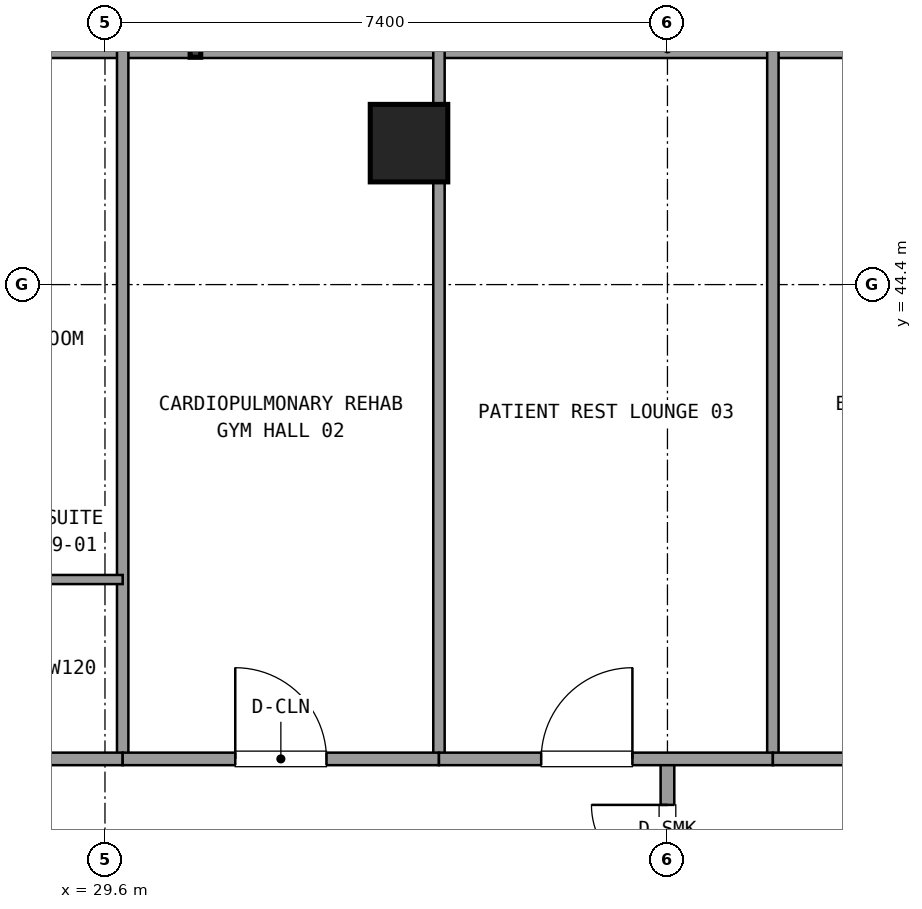
"""IFC4 building model, lengths in metres.
Left out: names, types, materials, properties, quantities, classifications, styles, units other than length and angle.
Written with IfcOpenShell. Run it as: python <this file> out.ifc"""

import sys

from ifc_helpers import new_model, si_unit, direction, frame, frame_2d, origin, origin_2d, place, context, subcontext, project, spatial, rectangle, extrude, element, fill, save


model = new_model("IFC4")
c1 = context("Model", 3, precision=1e-05, world=origin(), true_north=direction((0.0, 1.0)))
c2 = subcontext(c1, "Body", "Model", "MODEL_VIEW")
j1 = project(units=[si_unit("LENGTHUNIT", "METRE"), si_unit("PLANEANGLEUNIT", "RADIAN")], contexts=[c1])
p1 = place(None, origin())
s1 = spatial("IfcSite", under=j1, at=p1, CompositionType="ELEMENT")
p2 = place(p1, origin())
s2 = spatial("IfcBuilding", under=s1, at=p2, CompositionType="ELEMENT")
p3 = place(p2, frame((0.0, 0.0, 113.58)))
s3 = spatial("IfcBuildingStorey", under=s2, at=p3, CompositionType="ELEMENT", Elevation=113.58)
p4 = place(p3, frame((33.6, 46.261, 0.021), z_axis=(0.0, -0.024969910516, 0.999688203176), x_axis=(1.0, 0.0, 0.0)))
e1 = element("IfcColumn", 1, at=p4, inside=s3, PredefinedType="COLUMN", context=c2, shape_type="SweptSolid", body=[
    extrude(rectangle(XDim=1.02, YDim=1.02, at=origin_2d()), origin(), (0.0, 0.0, 1.0), 3.559),
])
p5 = place(p3, frame((55.629, 47.501, 0.0), z_axis=(0.0, 0.0, 1.0), x_axis=(-1.0, 0.0, 0.0)))
e2 = element("IfcWall", 2, at=p5, inside=s3, PredefinedType="SOLIDWALL", context=c2, shape_type="SweptSolid", body=[
    extrude(rectangle(XDim=37.258, YDim=0.24, at=frame_2d((18.629, 0.0))), origin(), (0.0, 0.0, 1.0), 0.85),
])
p6 = place(p3, frame((37.0, 34.95, 0.0), z_axis=(0.0, 0.0, 1.0), x_axis=(0.0, 1.0, 0.0)))
e3 = element("IfcWall", 3, at=p6, inside=s3, PredefinedType="PARTITIONING", context=c2, shape_type="SweptSolid", body=[
    extrude(rectangle(XDim=3.21, YDim=0.18, at=frame_2d((1.605, 0.0))), origin(), (0.0, 0.0, 1.0), 2.61),
])
p7 = place(p6, frame((0.605, 0.0, 0.0)))
e4 = element("IfcOpeningElement", 4, at=p7, cuts=e3, PredefinedType="OPENING", context=c2, shape_type="SweptSolid", body=[
    extrude(rectangle(XDim=2.0, YDim=2.2, at=frame_2d((1.0, 1.1))), frame((0.0, 0.1, 0.0), z_axis=(0.0, -1.0, 0.0), x_axis=(1.0, 0.0, 0.0)), (0.0, 0.0, 1.0), 0.2),
])
p8 = place(p3, frame((29.833, 38.16, 0.0), z_axis=(0.0, 0.0, 1.0), x_axis=(0.0, 1.0, 0.0)))
e5 = element("IfcWall", 5, at=p8, inside=s3, PredefinedType="PARTITIONING", context=c2, shape_type="SweptSolid", body=[
    extrude(rectangle(XDim=9.32, YDim=0.15, at=frame_2d((4.66, 0.0))), origin(), (0.0, 0.0, 1.0), 2.61),
])
p9 = place(p3, frame((25.43, 38.16, 0.0), z_axis=(0.0, 0.0, 1.0), x_axis=(1.0, 0.0, 0.0)))
e6 = element("IfcWall", 6, at=p9, inside=s3, PredefinedType="PARTITIONING", context=c2, shape_type="SweptSolid", body=[
    extrude(rectangle(XDim=4.403, YDim=0.165, at=frame_2d((2.202, 0.0))), origin(), (0.0, 0.0, 1.0), 2.61),
])
p10 = place(p9, frame((0.35, 0.0, 0.0)))
e7 = element("IfcOpeningElement", 7, at=p10, cuts=e6, PredefinedType="OPENING", context=c2, shape_type="SweptSolid", body=[
    extrude(rectangle(XDim=1.35, YDim=2.15, at=frame_2d((0.675, 1.075))), frame((0.0, 0.093, 0.0), z_axis=(0.0, -1.0, 0.0), x_axis=(1.0, 0.0, 0.0)), (0.0, 0.0, 1.0), 0.185),
])
p11 = place(p3, frame((27.693, 40.52, 0.0), z_axis=(0.0, 0.0, 1.0), x_axis=(1.0, 0.0, 0.0)))
e8 = element("IfcWall", 8, at=p11, inside=s3, PredefinedType="PLUMBINGWALL", context=c2, shape_type="SweptSolid", body=[
    extrude(rectangle(XDim=2.14, YDim=0.12, at=frame_2d((1.07, 0.0))), origin(), (0.0, 0.0, 1.0), 2.61),
])
p12 = place(p3, frame((33.994, 38.16, 0.0), z_axis=(0.0, 0.0, 1.0), x_axis=(0.0, 1.0, 0.0)))
e9 = element("IfcWall", 9, at=p12, inside=s3, PredefinedType="PARTITIONING", context=c2, shape_type="SweptSolid", body=[
    extrude(rectangle(XDim=9.32, YDim=0.15, at=frame_2d((4.66, 0.0))), origin(), (0.0, 0.0, 1.0), 2.61),
])
p13 = place(p3, frame((29.833, 38.16, 0.0), z_axis=(0.0, 0.0, 1.0), x_axis=(1.0, 0.0, 0.0)))
e10 = element("IfcWall", 10, at=p13, inside=s3, PredefinedType="PARTITIONING", context=c2, shape_type="SweptSolid", body=[
    extrude(rectangle(XDim=4.161, YDim=0.165, at=frame_2d((2.081, 0.0))), origin(), (0.0, 0.0, 1.0), 2.61),
])
p14 = place(p13, frame((1.481, 0.0, 0.0)))
e11 = element("IfcOpeningElement", 11, at=p14, cuts=e10, PredefinedType="OPENING", context=c2, shape_type="SweptSolid", body=[
    extrude(rectangle(XDim=1.2, YDim=2.15, at=frame_2d((0.6, 1.075))), frame((0.0, 0.093, 0.0), z_axis=(0.0, -1.0, 0.0), x_axis=(1.0, 0.0, 0.0)), (0.0, 0.0, 1.0), 0.185),
])
p15 = place(p3, frame((38.387, 38.16, 0.0), z_axis=(0.0, 0.0, 1.0), x_axis=(0.0, 1.0, 0.0)))
e12 = element("IfcWall", 12, at=p15, inside=s3, PredefinedType="PARTITIONING", context=c2, shape_type="SweptSolid", body=[
    extrude(rectangle(XDim=9.32, YDim=0.15, at=frame_2d((4.66, 0.0))), origin(), (0.0, 0.0, 1.0), 2.61),
])
p16 = place(p3, frame((33.994, 38.16, 0.0), z_axis=(0.0, 0.0, 1.0), x_axis=(1.0, 0.0, 0.0)))
e13 = element("IfcWall", 13, at=p16, inside=s3, PredefinedType="PARTITIONING", context=c2, shape_type="SweptSolid", body=[
    extrude(rectangle(XDim=4.393, YDim=0.165, at=frame_2d((2.197, 0.0))), origin(), (0.0, 0.0, 1.0), 2.61),
])
p17 = place(p16, frame((1.345, 0.0, 0.0)))
e14 = element("IfcOpeningElement", 14, at=p17, cuts=e13, PredefinedType="OPENING", context=c2, shape_type="SweptSolid", body=[
    extrude(rectangle(XDim=1.2, YDim=2.15, at=frame_2d((0.6, 1.075))), frame((0.0, 0.093, 0.0), z_axis=(0.0, -1.0, 0.0), x_axis=(1.0, 0.0, 0.0)), (0.0, 0.0, 1.0), 0.185),
])
p18 = place(p3, frame((38.387, 38.16, 0.0), z_axis=(0.0, 0.0, 1.0), x_axis=(1.0, 0.0, 0.0)))
e15 = element("IfcWall", 15, at=p18, inside=s3, PredefinedType="PARTITIONING", context=c2, shape_type="SweptSolid", body=[
    extrude(rectangle(XDim=4.855, YDim=0.165, at=frame_2d((2.427, 0.0))), origin(), (0.0, 0.0, 1.0), 2.61),
])
p19 = place(p18, frame((1.827, 0.0, 0.0)))
e16 = element("IfcOpeningElement", 16, at=p19, cuts=e15, PredefinedType="OPENING", context=c2, shape_type="SweptSolid", body=[
    extrude(rectangle(XDim=1.2, YDim=2.15, at=frame_2d((0.6, 1.075))), frame((0.0, 0.093, 0.0), z_axis=(0.0, -1.0, 0.0), x_axis=(1.0, 0.0, 0.0)), (0.0, 0.0, 1.0), 0.185),
])
p20 = place(p7, origin())
e17 = element("IfcDoor", 17, at=p20, inside=s3, OperationType="DOUBLE_DOOR_SINGLE_SWING", PredefinedType="DOOR", context=c2, shape_type="SweptSolid", body=[
    extrude(rectangle(XDim=2.0, YDim=2.2, at=frame_2d((1.0, 1.1))), frame((0.0, 0.025, 0.0), z_axis=(0.0, -1.0, 0.0), x_axis=(1.0, 0.0, 0.0)), (0.0, 0.0, 1.0), 0.05),
])
fill(e4, e17)
p21 = place(p14, origin())
e18 = element("IfcDoor", 18, at=p21, inside=s3, OperationType="SINGLE_SWING_LEFT", PredefinedType="DOOR", context=c2, shape_type="SweptSolid", body=[
    extrude(rectangle(XDim=1.2, YDim=2.15, at=frame_2d((0.6, 1.075))), frame((0.0, 0.025, 0.0), z_axis=(0.0, -1.0, 0.0), x_axis=(1.0, 0.0, 0.0)), (0.0, 0.0, 1.0), 0.05),
])
fill(e11, e18)
p22 = place(p17, origin())
e19 = element("IfcDoor", 19, at=p22, inside=s3, OperationType="SINGLE_SWING_RIGHT", PredefinedType="DOOR", context=c2, shape_type="SweptSolid", body=[
    extrude(rectangle(XDim=1.2, YDim=2.15, at=frame_2d((0.6, 1.075))), frame((0.0, 0.025, 0.0), z_axis=(0.0, -1.0, 0.0), x_axis=(1.0, 0.0, 0.0)), (0.0, 0.0, 1.0), 0.05),
])
fill(e14, e19)
save(model, sys.argv[1])
